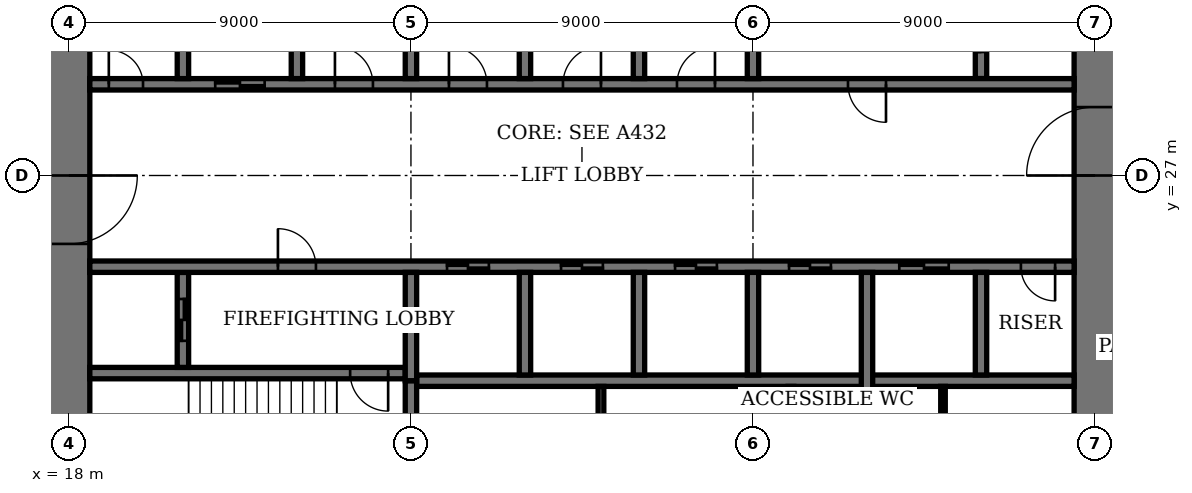
"""IFC4 building model, lengths in metres.
Left out: names, types, materials, properties, quantities, classifications, styles, units other than length and angle.
Written with IfcOpenShell. Run it as: python <this file> out.ifc"""

import sys

from ifc_helpers import new_model, si_unit, direction, frame, frame_2d, origin, place, context, subcontext, project, spatial, rectangle, extrude, element, fill, save


model = new_model("IFC4")
c1 = context("Model", 3, precision=1e-05, world=origin(), true_north=direction((0.0, 1.0)))
c2 = subcontext(c1, "Body", "Model", "MODEL_VIEW")
j1 = project(units=[si_unit("LENGTHUNIT", "METRE"), si_unit("PLANEANGLEUNIT", "RADIAN")], contexts=[c1])
p1 = place(None, origin())
s1 = spatial("IfcSite", under=j1, at=p1, CompositionType="ELEMENT")
p2 = place(p1, origin())
s2 = spatial("IfcBuilding", under=s1, at=p2, CompositionType="ELEMENT")
p3 = place(p2, frame((0.0, 0.0, 295.4)))
s3 = spatial("IfcBuildingStorey", under=s2, at=p3, CompositionType="ELEMENT", Elevation=295.4)
p4 = place(p3, frame((18.0, 35.45, 0.0), z_axis=(0.0, 0.0, 1.0), x_axis=(0.0, -1.0, 0.0)))
e1 = element("IfcWall", 1, at=p4, inside=s3, PredefinedType="SHEAR", context=c2, shape_type="SweptSolid", body=[
    extrude(rectangle(XDim=16.9, YDim=1.1, at=frame_2d((8.45, 0.0))), origin(), (0.0, 0.0, 1.0), 4.0),
])
p5 = place(p4, frame((8.45, 0.0, 0.0)))
e2 = element("IfcOpeningElement", 2, at=p5, cuts=e1, PredefinedType="OPENING", context=c2, shape_type="SweptSolid", body=[
    extrude(rectangle(XDim=1.8, YDim=2.4, at=frame_2d((0.9, 1.2))), frame((0.0, 0.56, 0.0), z_axis=(0.0, -1.0, 0.0), x_axis=(1.0, 0.0, 0.0)), (0.0, 0.0, 1.0), 1.12),
])
p6 = place(p3, frame((45.0, 18.55, 0.0), z_axis=(0.0, 0.0, 1.0), x_axis=(0.0, 1.0, 0.0)))
e3 = element("IfcWall", 3, at=p6, inside=s3, PredefinedType="SHEAR", context=c2, shape_type="SweptSolid", body=[
    extrude(rectangle(XDim=16.9, YDim=1.1, at=frame_2d((8.45, 0.0))), origin(), (0.0, 0.0, 1.0), 4.0),
])
p7 = place(p6, frame((8.45, 0.0, 0.0)))
e4 = element("IfcOpeningElement", 4, at=p7, cuts=e3, PredefinedType="OPENING", context=c2, shape_type="SweptSolid", body=[
    extrude(rectangle(XDim=1.8, YDim=2.4, at=frame_2d((0.9, 1.2))), frame((0.0, 0.56, 0.0), z_axis=(0.0, -1.0, 0.0), x_axis=(1.0, 0.0, 0.0)), (0.0, 0.0, 1.0), 1.12),
])
p8 = place(p3, frame((18.55, 21.8, 0.0), z_axis=(0.0, 0.0, 1.0), x_axis=(1.0, 0.0, 0.0)))
e5 = element("IfcWall", 5, at=p8, inside=s3, PredefinedType="SHEAR", context=c2, shape_type="SweptSolid", body=[
    extrude(rectangle(XDim=8.3, YDim=0.3, at=frame_2d((4.15, 0.0))), origin(), (0.0, 0.0, 1.0), 4.0),
])
p9 = place(p8, frame((6.85, 0.0, 0.0)))
e6 = element("IfcOpeningElement", 6, at=p9, cuts=e5, PredefinedType="OPENING", context=c2, shape_type="SweptSolid", body=[
    extrude(rectangle(XDim=1.0, YDim=2.4, at=frame_2d((0.5, 1.2))), frame((0.0, 0.16, 0.0), z_axis=(0.0, -1.0, 0.0), x_axis=(1.0, 0.0, 0.0)), (0.0, 0.0, 1.0), 0.32),
])
p10 = place(p3, frame((27.0, 18.55, 0.0), z_axis=(0.0, 0.0, 1.0), x_axis=(0.0, 1.0, 0.0)))
e7 = element("IfcWall", 7, at=p10, inside=s3, PredefinedType="SHEAR", context=c2, shape_type="SweptSolid", body=[
    extrude(rectangle(XDim=3.05, YDim=0.3, at=frame_2d((1.525, 0.0))), origin(), (0.0, 0.0, 1.0), 4.0),
])
p11 = place(p3, frame((21.0, 21.95, 0.0), z_axis=(0.0, 0.0, 1.0), x_axis=(0.0, 1.0, 0.0)))
e8 = element("IfcWall", 8, at=p11, inside=s3, PredefinedType="SHEAR", context=c2, shape_type="SweptSolid", body=[
    extrude(rectangle(XDim=2.5, YDim=0.3, at=frame_2d((1.25, 0.0))), origin(), (0.0, 0.0, 1.0), 4.0),
])
p12 = place(p11, frame((0.7, 0.0, 0.0)))
e9 = element("IfcOpeningElement", 9, at=p12, cuts=e8, PredefinedType="OPENING", context=c2, shape_type="SweptSolid", body=[
    extrude(rectangle(XDim=1.1, YDim=2.4, at=frame_2d((0.55, 1.2))), frame((0.0, 0.16, 0.0), z_axis=(0.0, -1.0, 0.0), x_axis=(1.0, 0.0, 0.0)), (0.0, 0.0, 1.0), 0.32),
])
p13 = place(p3, frame((42.0, 29.55, 0.0), z_axis=(0.0, 0.0, 1.0), x_axis=(0.0, 1.0, 0.0)))
e10 = element("IfcWall", 10, at=p13, inside=s3, PredefinedType="SHEAR", context=c2, shape_type="SweptSolid", body=[
    extrude(rectangle(XDim=2.5, YDim=0.3, at=frame_2d((1.25, 0.0))), origin(), (0.0, 0.0, 1.0), 4.0),
])
p14 = place(p13, frame((0.7, 0.0, 0.0)))
e11 = element("IfcOpeningElement", 11, at=p14, cuts=e10, PredefinedType="OPENING", context=c2, shape_type="SweptSolid", body=[
    extrude(rectangle(XDim=1.1, YDim=2.4, at=frame_2d((0.55, 1.2))), frame((0.0, 0.16, 0.0), z_axis=(0.0, -1.0, 0.0), x_axis=(1.0, 0.0, 0.0)), (0.0, 0.0, 1.0), 0.32),
])
p15 = place(p3, frame((18.55, 24.6, 0.0), z_axis=(0.0, 0.0, 1.0), x_axis=(1.0, 0.0, 0.0)))
e12 = element("IfcWall", 12, at=p15, inside=s3, PredefinedType="SHEAR", context=c2, shape_type="SweptSolid", body=[
    extrude(rectangle(XDim=25.9, YDim=0.3, at=frame_2d((12.95, 0.0))), origin(), (0.0, 0.0, 1.0), 4.0),
])
p16 = place(p15, frame((4.95, 0.0, 0.0)))
e13 = element("IfcOpeningElement", 13, at=p16, cuts=e12, PredefinedType="OPENING", context=c2, shape_type="SweptSolid", body=[
    extrude(rectangle(XDim=1.0, YDim=2.4, at=frame_2d((0.5, 1.2))), frame((0.0, 0.16, 0.0), z_axis=(0.0, -1.0, 0.0), x_axis=(1.0, 0.0, 0.0)), (0.0, 0.0, 1.0), 0.32),
])
p17 = place(p15, frame((24.5, 0.0, 0.0)))
e14 = element("IfcOpeningElement", 14, at=p17, cuts=e12, PredefinedType="OPENING", context=c2, shape_type="SweptSolid", body=[
    extrude(rectangle(XDim=0.9, YDim=2.1, at=frame_2d((0.45, 1.05))), frame((0.0, 0.16, 0.0), z_axis=(0.0, -1.0, 0.0), x_axis=(1.0, 0.0, 0.0)), (0.0, 0.0, 1.0), 0.32),
])
p18 = place(p15, frame((9.4, 0.0, 0.0)))
e15 = element("IfcOpeningElement", 15, at=p18, cuts=e12, PredefinedType="OPENING", context=c2, shape_type="SweptSolid", body=[
    extrude(rectangle(XDim=1.1, YDim=2.4, at=frame_2d((0.55, 1.2))), frame((0.0, 0.16, 0.0), z_axis=(0.0, -1.0, 0.0), x_axis=(1.0, 0.0, 0.0)), (0.0, 0.0, 1.0), 0.32),
])
p19 = place(p15, frame((12.4, 0.0, 0.0)))
e16 = element("IfcOpeningElement", 16, at=p19, cuts=e12, PredefinedType="OPENING", context=c2, shape_type="SweptSolid", body=[
    extrude(rectangle(XDim=1.1, YDim=2.4, at=frame_2d((0.55, 1.2))), frame((0.0, 0.16, 0.0), z_axis=(0.0, -1.0, 0.0), x_axis=(1.0, 0.0, 0.0)), (0.0, 0.0, 1.0), 0.32),
])
p20 = place(p15, frame((15.4, 0.0, 0.0)))
e17 = element("IfcOpeningElement", 17, at=p20, cuts=e12, PredefinedType="OPENING", context=c2, shape_type="SweptSolid", body=[
    extrude(rectangle(XDim=1.1, YDim=2.4, at=frame_2d((0.55, 1.2))), frame((0.0, 0.16, 0.0), z_axis=(0.0, -1.0, 0.0), x_axis=(1.0, 0.0, 0.0)), (0.0, 0.0, 1.0), 0.32),
])
p21 = place(p15, frame((18.4, 0.0, 0.0)))
e18 = element("IfcOpeningElement", 18, at=p21, cuts=e12, PredefinedType="OPENING", context=c2, shape_type="SweptSolid", body=[
    extrude(rectangle(XDim=1.1, YDim=2.4, at=frame_2d((0.55, 1.2))), frame((0.0, 0.16, 0.0), z_axis=(0.0, -1.0, 0.0), x_axis=(1.0, 0.0, 0.0)), (0.0, 0.0, 1.0), 0.32),
])
p22 = place(p15, frame((21.3, 0.0, 0.0)))
e19 = element("IfcOpeningElement", 19, at=p22, cuts=e12, PredefinedType="OPENING", context=c2, shape_type="SweptSolid", body=[
    extrude(rectangle(XDim=1.3, YDim=2.4, at=frame_2d((0.65, 1.2))), frame((0.0, 0.16, 0.0), z_axis=(0.0, -1.0, 0.0), x_axis=(1.0, 0.0, 0.0)), (0.0, 0.0, 1.0), 0.32),
])
p23 = place(p3, frame((18.55, 29.4, 0.0), z_axis=(0.0, 0.0, 1.0), x_axis=(1.0, 0.0, 0.0)))
e20 = element("IfcWall", 20, at=p23, inside=s3, PredefinedType="SHEAR", context=c2, shape_type="SweptSolid", body=[
    extrude(rectangle(XDim=25.9, YDim=0.3, at=frame_2d((12.95, 0.0))), origin(), (0.0, 0.0, 1.0), 4.0),
])
p24 = place(p23, frame((19.95, 0.0, 0.0)))
e21 = element("IfcOpeningElement", 21, at=p24, cuts=e20, PredefinedType="OPENING", context=c2, shape_type="SweptSolid", body=[
    extrude(rectangle(XDim=1.0, YDim=2.4, at=frame_2d((0.5, 1.2))), frame((0.0, 0.16, 0.0), z_axis=(0.0, -1.0, 0.0), x_axis=(1.0, 0.0, 0.0)), (0.0, 0.0, 1.0), 0.32),
])
p25 = place(p23, frame((0.5, 0.0, 0.0)))
e22 = element("IfcOpeningElement", 22, at=p25, cuts=e20, PredefinedType="OPENING", context=c2, shape_type="SweptSolid", body=[
    extrude(rectangle(XDim=0.9, YDim=2.1, at=frame_2d((0.45, 1.05))), frame((0.0, 0.16, 0.0), z_axis=(0.0, -1.0, 0.0), x_axis=(1.0, 0.0, 0.0)), (0.0, 0.0, 1.0), 0.32),
])
p26 = place(p23, frame((15.45, 0.0, 0.0)))
e23 = element("IfcOpeningElement", 23, at=p26, cuts=e20, PredefinedType="OPENING", context=c2, shape_type="SweptSolid", body=[
    extrude(rectangle(XDim=1.0, YDim=2.4, at=frame_2d((0.5, 1.2))), frame((0.0, 0.16, 0.0), z_axis=(0.0, -1.0, 0.0), x_axis=(1.0, 0.0, 0.0)), (0.0, 0.0, 1.0), 0.32),
])
p27 = place(p23, frame((12.45, 0.0, 0.0)))
e24 = element("IfcOpeningElement", 24, at=p27, cuts=e20, PredefinedType="OPENING", context=c2, shape_type="SweptSolid", body=[
    extrude(rectangle(XDim=1.0, YDim=2.4, at=frame_2d((0.5, 1.2))), frame((0.0, 0.16, 0.0), z_axis=(0.0, -1.0, 0.0), x_axis=(1.0, 0.0, 0.0)), (0.0, 0.0, 1.0), 0.32),
])
p28 = place(p23, frame((9.45, 0.0, 0.0)))
e25 = element("IfcOpeningElement", 25, at=p28, cuts=e20, PredefinedType="OPENING", context=c2, shape_type="SweptSolid", body=[
    extrude(rectangle(XDim=1.0, YDim=2.4, at=frame_2d((0.5, 1.2))), frame((0.0, 0.16, 0.0), z_axis=(0.0, -1.0, 0.0), x_axis=(1.0, 0.0, 0.0)), (0.0, 0.0, 1.0), 0.32),
])
p29 = place(p23, frame((6.45, 0.0, 0.0)))
e26 = element("IfcOpeningElement", 26, at=p29, cuts=e20, PredefinedType="OPENING", context=c2, shape_type="SweptSolid", body=[
    extrude(rectangle(XDim=1.0, YDim=2.4, at=frame_2d((0.5, 1.2))), frame((0.0, 0.16, 0.0), z_axis=(0.0, -1.0, 0.0), x_axis=(1.0, 0.0, 0.0)), (0.0, 0.0, 1.0), 0.32),
])
p30 = place(p23, frame((3.3, 0.0, 0.0)))
e27 = element("IfcOpeningElement", 27, at=p30, cuts=e20, PredefinedType="OPENING", context=c2, shape_type="SweptSolid", body=[
    extrude(rectangle(XDim=1.3, YDim=2.4, at=frame_2d((0.65, 1.2))), frame((0.0, 0.16, 0.0), z_axis=(0.0, -1.0, 0.0), x_axis=(1.0, 0.0, 0.0)), (0.0, 0.0, 1.0), 0.32),
])
p31 = place(p3, frame((27.15, 21.6, 0.0), z_axis=(0.0, 0.0, 1.0), x_axis=(1.0, 0.0, 0.0)))
e28 = element("IfcWall", 28, at=p31, inside=s3, PredefinedType="SHEAR", context=c2, shape_type="SweptSolid", body=[
    extrude(rectangle(XDim=17.3, YDim=0.3, at=frame_2d((8.65, 0.0))), origin(), (0.0, 0.0, 1.0), 4.0),
])
for number, where, z_axis, x_axis in (
    (29, (30.0, 21.75, 0.0), (0.0, 0.0, 1.0), (0.0, 1.0, 0.0)),
    (30, (33.0, 29.55, 0.0), (0.0, 0.0, 1.0), (0.0, 1.0, 0.0)),
    (31, (33.0, 21.75, 0.0), (0.0, 0.0, 1.0), (0.0, 1.0, 0.0)),
    (32, (30.0, 29.55, 0.0), (0.0, 0.0, 1.0), (0.0, 1.0, 0.0)),
    (33, (36.0, 21.75, 0.0), (0.0, 0.0, 1.0), (0.0, 1.0, 0.0)),
    (34, (27.0, 29.55, 0.0), (0.0, 0.0, 1.0), (0.0, 1.0, 0.0)),
):
    element("IfcWall", number, at=place(p3, frame(where, z_axis=z_axis, x_axis=x_axis)), inside=s3, PredefinedType="SHEAR", context=c2, shape_type="SweptSolid", body=[
        extrude(rectangle(XDim=2.7, YDim=0.3, at=frame_2d((1.35, 0.0))), origin(), (0.0, 0.0, 1.0), 4.0),
    ])
for number, where, z_axis, x_axis in (
    (35, (39.0, 18.55, 0.0), (0.0, 0.0, 1.0), (0.0, 1.0, 0.0)),
    (36, (24.0, 29.55, 0.0), (0.0, 0.0, 1.0), (0.0, 1.0, 0.0)),
):
    element("IfcWall", number, at=place(p3, frame(where, z_axis=z_axis, x_axis=x_axis)), inside=s3, PredefinedType="SHEAR", context=c2, shape_type="SweptSolid", body=[
        extrude(rectangle(XDim=5.9, YDim=0.3, at=frame_2d((2.95, 0.0))), origin(), (0.0, 0.0, 1.0), 4.0),
    ])
for number, where, z_axis, x_axis in (
    (37, (42.0, 21.75, 0.0), (0.0, 0.0, 1.0), (0.0, 1.0, 0.0)),
    (38, (21.0, 29.55, 0.0), (0.0, 0.0, 1.0), (0.0, 1.0, 0.0)),
):
    element("IfcWall", number, at=place(p3, frame(where, z_axis=z_axis, x_axis=x_axis)), inside=s3, PredefinedType="SHEAR", context=c2, shape_type="SweptSolid", body=[
        extrude(rectangle(XDim=2.7, YDim=0.3, at=frame_2d((1.35, 0.0))), origin(), (0.0, 0.0, 1.0), 4.0),
    ])
for number, where, z_axis, x_axis in (
    (39, (27.0, 21.6, 0.0), (0.0, 0.0, 1.0), (0.0, 1.0, 0.0)),
    (40, (36.0, 29.55, 0.0), (0.0, 0.0, 1.0), (0.0, 1.0, 0.0)),
):
    element("IfcWall", number, at=place(p3, frame(where, z_axis=z_axis, x_axis=x_axis)), inside=s3, PredefinedType="SHEAR", context=c2, shape_type="SweptSolid", body=[
        extrude(rectangle(XDim=2.85, YDim=0.3, at=frame_2d((1.425, 0.0))), origin(), (0.0, 0.0, 1.0), 4.0),
    ])
for number, where, z_axis, x_axis in (
    (41, (32.0, 18.55, 0.0), (0.0, 0.0, 1.0), (0.0, 1.0, 0.0)),
    (42, (37.0, 18.55, 0.0), (0.0, 0.0, 1.0), (0.0, 1.0, 0.0)),
):
    element("IfcWall", number, at=place(p3, frame(where, z_axis=z_axis, x_axis=x_axis)), inside=s3, PredefinedType="PARTITIONING", context=c2, shape_type="SweptSolid", body=[
        extrude(rectangle(XDim=2.9, YDim=0.15, at=frame_2d((1.45, 0.0))), origin(), (0.0, 0.0, 1.0), 3.75),
    ])
p32 = place(p3, frame((41.0, 18.55, 0.0), z_axis=(0.0, 0.0, 1.0), x_axis=(0.0, 1.0, 0.0)))
e43 = element("IfcWall", 43, at=p32, inside=s3, PredefinedType="PARTITIONING", context=c2, shape_type="SweptSolid", body=[
    extrude(rectangle(XDim=2.9, YDim=0.12, at=frame_2d((1.45, 0.0))), origin(), (0.0, 0.0, 1.0), 3.75),
])
p33 = place(p32, frame((0.95, 0.0, 0.0)))
e44 = element("IfcOpeningElement", 44, at=p33, cuts=e43, PredefinedType="OPENING", context=c2, shape_type="SweptSolid", body=[
    extrude(rectangle(XDim=1.0, YDim=2.4, at=frame_2d((0.5, 1.2))), frame((0.0, 0.07, 0.0), z_axis=(0.0, -1.0, 0.0), x_axis=(1.0, 0.0, 0.0)), (0.0, 0.0, 1.0), 0.14),
])
p34 = place(p5, origin())
e45 = element("IfcDoor", 45, at=p34, inside=s3, OperationType="DOUBLE_DOOR_DOUBLE_SWING", PredefinedType="DOOR", context=c2, shape_type="SweptSolid", body=[
    extrude(rectangle(XDim=1.8, YDim=2.4, at=frame_2d((0.9, 1.2))), frame((0.0, 0.03, 0.0), z_axis=(0.0, -1.0, 0.0), x_axis=(1.0, 0.0, 0.0)), (0.0, 0.0, 1.0), 0.06),
    extrude(rectangle(XDim=0.04, YDim=2.4, at=frame_2d((0.02, 1.2))), frame((0.0, 0.55, 0.0), z_axis=(0.0, -1.0, 0.0), x_axis=(1.0, 0.0, 0.0)), (0.0, 0.0, 1.0), 1.1),
    extrude(rectangle(XDim=0.04, YDim=2.4, at=frame_2d((1.78, 1.2))), frame((0.0, 0.55, 0.0), z_axis=(0.0, -1.0, 0.0), x_axis=(1.0, 0.0, 0.0)), (0.0, 0.0, 1.0), 1.1),
    extrude(rectangle(XDim=1.8, YDim=0.04, at=frame_2d((0.9, 2.38))), frame((0.0, 0.55, 0.0), z_axis=(0.0, -1.0, 0.0), x_axis=(1.0, 0.0, 0.0)), (0.0, 0.0, 1.0), 1.1),
])
fill(e2, e45)
p35 = place(p7, origin())
e46 = element("IfcDoor", 46, at=p35, inside=s3, OperationType="DOUBLE_DOOR_DOUBLE_SWING", PredefinedType="DOOR", context=c2, shape_type="SweptSolid", body=[
    extrude(rectangle(XDim=1.8, YDim=2.4, at=frame_2d((0.9, 1.2))), frame((0.0, 0.03, 0.0), z_axis=(0.0, -1.0, 0.0), x_axis=(1.0, 0.0, 0.0)), (0.0, 0.0, 1.0), 0.06),
    extrude(rectangle(XDim=0.04, YDim=2.4, at=frame_2d((0.02, 1.2))), frame((0.0, 0.55, 0.0), z_axis=(0.0, -1.0, 0.0), x_axis=(1.0, 0.0, 0.0)), (0.0, 0.0, 1.0), 1.1),
    extrude(rectangle(XDim=0.04, YDim=2.4, at=frame_2d((1.78, 1.2))), frame((0.0, 0.55, 0.0), z_axis=(0.0, -1.0, 0.0), x_axis=(1.0, 0.0, 0.0)), (0.0, 0.0, 1.0), 1.1),
    extrude(rectangle(XDim=1.8, YDim=0.04, at=frame_2d((0.9, 2.38))), frame((0.0, 0.55, 0.0), z_axis=(0.0, -1.0, 0.0), x_axis=(1.0, 0.0, 0.0)), (0.0, 0.0, 1.0), 1.1),
])
fill(e4, e46)
p36 = place(p9, origin())
e47 = element("IfcDoor", 47, at=p36, inside=s3, OperationType="SINGLE_SWING_RIGHT", PredefinedType="DOOR", context=c2, shape_type="SweptSolid", body=[
    extrude(rectangle(XDim=1.0, YDim=2.4, at=frame_2d((0.5, 1.2))), frame((0.0, 0.03, 0.0), z_axis=(0.0, -1.0, 0.0), x_axis=(1.0, 0.0, 0.0)), (0.0, 0.0, 1.0), 0.06),
])
fill(e6, e47)
p37 = place(p16, origin())
e48 = element("IfcDoor", 48, at=p37, inside=s3, OperationType="SINGLE_SWING_RIGHT", PredefinedType="DOOR", context=c2, shape_type="SweptSolid", body=[
    extrude(rectangle(XDim=1.0, YDim=2.4, at=frame_2d((0.5, 1.2))), frame((0.0, 0.03, 0.0), z_axis=(0.0, -1.0, 0.0), x_axis=(1.0, 0.0, 0.0)), (0.0, 0.0, 1.0), 0.06),
])
fill(e13, e48)
p38 = place(p24, origin())
e49 = element("IfcDoor", 49, at=p38, inside=s3, OperationType="SINGLE_SWING_RIGHT", PredefinedType="DOOR", context=c2, shape_type="SweptSolid", body=[
    extrude(rectangle(XDim=1.0, YDim=2.4, at=frame_2d((0.5, 1.2))), frame((0.0, 0.03, 0.0), z_axis=(0.0, -1.0, 0.0), x_axis=(1.0, 0.0, 0.0)), (0.0, 0.0, 1.0), 0.06),
])
fill(e21, e49)
p39 = place(p17, origin())
e50 = element("IfcDoor", 50, at=p39, inside=s3, OperationType="SINGLE_SWING_RIGHT", PredefinedType="DOOR", context=c2, shape_type="SweptSolid", body=[
    extrude(rectangle(XDim=0.9, YDim=2.1, at=frame_2d((0.45, 1.05))), frame((0.0, 0.03, 0.0), z_axis=(0.0, -1.0, 0.0), x_axis=(1.0, 0.0, 0.0)), (0.0, 0.0, 1.0), 0.06),
])
fill(e14, e50)
p40 = place(p25, origin())
e51 = element("IfcDoor", 51, at=p40, inside=s3, OperationType="SINGLE_SWING_RIGHT", PredefinedType="DOOR", context=c2, shape_type="SweptSolid", body=[
    extrude(rectangle(XDim=0.9, YDim=2.1, at=frame_2d((0.45, 1.05))), frame((0.0, 0.03, 0.0), z_axis=(0.0, -1.0, 0.0), x_axis=(1.0, 0.0, 0.0)), (0.0, 0.0, 1.0), 0.06),
])
fill(e22, e51)
p41 = place(p18, origin())
e52 = element("IfcDoor", 52, at=p41, inside=s3, OperationType="DOUBLE_DOOR_SLIDING", PredefinedType="DOOR", context=c2, shape_type="SweptSolid", body=[
    extrude(rectangle(XDim=1.1, YDim=2.4, at=frame_2d((0.55, 1.2))), frame((0.0, 0.02, 0.0), z_axis=(0.0, -1.0, 0.0), x_axis=(1.0, 0.0, 0.0)), (0.0, 0.0, 1.0), 0.04),
])
fill(e15, e52)
p42 = place(p19, origin())
e53 = element("IfcDoor", 53, at=p42, inside=s3, OperationType="DOUBLE_DOOR_SLIDING", PredefinedType="DOOR", context=c2, shape_type="SweptSolid", body=[
    extrude(rectangle(XDim=1.1, YDim=2.4, at=frame_2d((0.55, 1.2))), frame((0.0, 0.02, 0.0), z_axis=(0.0, -1.0, 0.0), x_axis=(1.0, 0.0, 0.0)), (0.0, 0.0, 1.0), 0.04),
])
fill(e16, e53)
p43 = place(p20, origin())
e54 = element("IfcDoor", 54, at=p43, inside=s3, OperationType="DOUBLE_DOOR_SLIDING", PredefinedType="DOOR", context=c2, shape_type="SweptSolid", body=[
    extrude(rectangle(XDim=1.1, YDim=2.4, at=frame_2d((0.55, 1.2))), frame((0.0, 0.02, 0.0), z_axis=(0.0, -1.0, 0.0), x_axis=(1.0, 0.0, 0.0)), (0.0, 0.0, 1.0), 0.04),
])
fill(e17, e54)
p44 = place(p21, origin())
e55 = element("IfcDoor", 55, at=p44, inside=s3, OperationType="DOUBLE_DOOR_SLIDING", PredefinedType="DOOR", context=c2, shape_type="SweptSolid", body=[
    extrude(rectangle(XDim=1.1, YDim=2.4, at=frame_2d((0.55, 1.2))), frame((0.0, 0.02, 0.0), z_axis=(0.0, -1.0, 0.0), x_axis=(1.0, 0.0, 0.0)), (0.0, 0.0, 1.0), 0.04),
])
fill(e18, e55)
p45 = place(p26, origin())
e56 = element("IfcDoor", 56, at=p45, inside=s3, OperationType="SINGLE_SWING_LEFT", PredefinedType="DOOR", context=c2, shape_type="SweptSolid", body=[
    extrude(rectangle(XDim=1.0, YDim=2.4, at=frame_2d((0.5, 1.2))), frame((0.0, 0.03, 0.0), z_axis=(0.0, -1.0, 0.0), x_axis=(1.0, 0.0, 0.0)), (0.0, 0.0, 1.0), 0.06),
])
fill(e23, e56)
p46 = place(p27, origin())
e57 = element("IfcDoor", 57, at=p46, inside=s3, OperationType="SINGLE_SWING_LEFT", PredefinedType="DOOR", context=c2, shape_type="SweptSolid", body=[
    extrude(rectangle(XDim=1.0, YDim=2.4, at=frame_2d((0.5, 1.2))), frame((0.0, 0.03, 0.0), z_axis=(0.0, -1.0, 0.0), x_axis=(1.0, 0.0, 0.0)), (0.0, 0.0, 1.0), 0.06),
])
fill(e24, e57)
p47 = place(p28, origin())
e58 = element("IfcDoor", 58, at=p47, inside=s3, OperationType="SINGLE_SWING_RIGHT", PredefinedType="DOOR", context=c2, shape_type="SweptSolid", body=[
    extrude(rectangle(XDim=1.0, YDim=2.4, at=frame_2d((0.5, 1.2))), frame((0.0, 0.03, 0.0), z_axis=(0.0, -1.0, 0.0), x_axis=(1.0, 0.0, 0.0)), (0.0, 0.0, 1.0), 0.06),
])
fill(e25, e58)
p48 = place(p29, origin())
e59 = element("IfcDoor", 59, at=p48, inside=s3, OperationType="SINGLE_SWING_RIGHT", PredefinedType="DOOR", context=c2, shape_type="SweptSolid", body=[
    extrude(rectangle(XDim=1.0, YDim=2.4, at=frame_2d((0.5, 1.2))), frame((0.0, 0.03, 0.0), z_axis=(0.0, -1.0, 0.0), x_axis=(1.0, 0.0, 0.0)), (0.0, 0.0, 1.0), 0.06),
])
fill(e26, e59)
p49 = place(p22, origin())
e60 = element("IfcDoor", 60, at=p49, inside=s3, OperationType="DOUBLE_DOOR_SLIDING", PredefinedType="DOOR", context=c2, shape_type="SweptSolid", body=[
    extrude(rectangle(XDim=1.3, YDim=2.4, at=frame_2d((0.65, 1.2))), frame((0.0, 0.02, 0.0), z_axis=(0.0, -1.0, 0.0), x_axis=(1.0, 0.0, 0.0)), (0.0, 0.0, 1.0), 0.04),
])
fill(e19, e60)
p50 = place(p30, origin())
e61 = element("IfcDoor", 61, at=p50, inside=s3, OperationType="DOUBLE_DOOR_SLIDING", PredefinedType="DOOR", context=c2, shape_type="SweptSolid", body=[
    extrude(rectangle(XDim=1.3, YDim=2.4, at=frame_2d((0.65, 1.2))), frame((0.0, 0.02, 0.0), z_axis=(0.0, -1.0, 0.0), x_axis=(1.0, 0.0, 0.0)), (0.0, 0.0, 1.0), 0.04),
])
fill(e27, e61)
p51 = place(p12, origin())
e62 = element("IfcDoor", 62, at=p51, inside=s3, OperationType="DOUBLE_DOOR_SLIDING", PredefinedType="DOOR", context=c2, shape_type="SweptSolid", body=[
    extrude(rectangle(XDim=1.1, YDim=2.4, at=frame_2d((0.55, 1.2))), frame((0.0, 0.03, 0.0), z_axis=(0.0, -1.0, 0.0), x_axis=(1.0, 0.0, 0.0)), (0.0, 0.0, 1.0), 0.06),
])
fill(e9, e62)
save(model, sys.argv[1])
